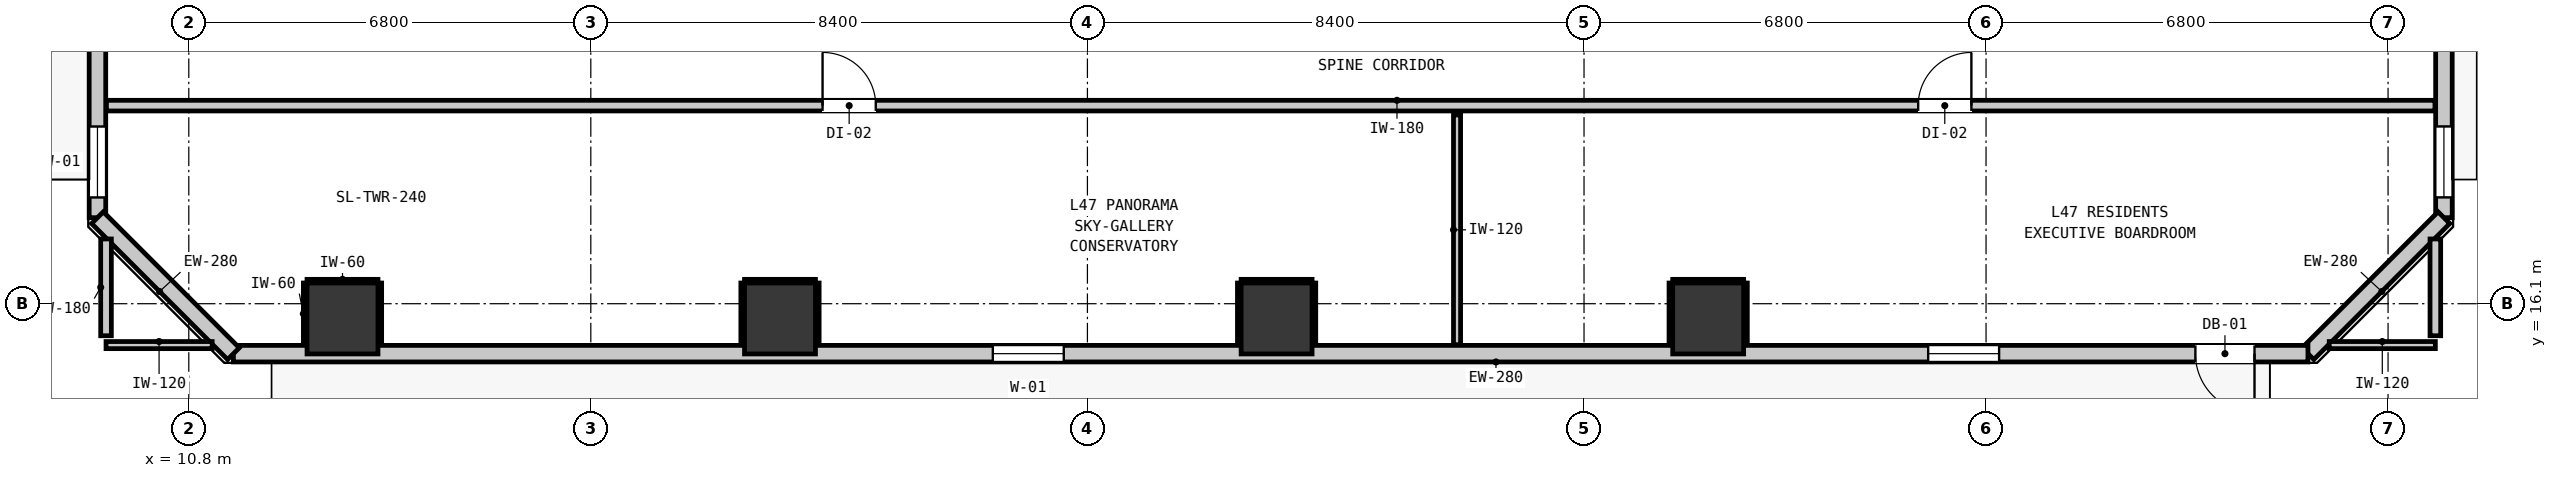
"""IFC4 building model, lengths in metres.
Left out: names, types, materials, properties, quantities, classifications, styles, units other than length and angle.
Written with IfcOpenShell. Run it as: python <this file> out.ifc"""

import sys

from ifc_helpers import new_model, si_unit, direction, frame, frame_2d, origin, origin_2d, place, context, subcontext, project, spatial, rectangle, extrude, element, fill, save


model = new_model("IFC4")
c1 = context("Model", 3, precision=1e-05, world=origin(), true_north=direction((0.0, 1.0)))
c2 = subcontext(c1, "Body", "Model", "MODEL_VIEW")
j1 = project(units=[si_unit("LENGTHUNIT", "METRE"), si_unit("PLANEANGLEUNIT", "RADIAN")], contexts=[c1])
p1 = place(None, origin())
s1 = spatial("IfcSite", under=j1, at=p1, CompositionType="ELEMENT")
p2 = place(p1, origin())
s2 = spatial("IfcBuilding", under=s1, at=p2, CompositionType="ELEMENT")
p3 = place(p2, frame((0.0, 0.0, 162.52)))
s3 = spatial("IfcBuildingStorey", under=s2, at=p3, CompositionType="ELEMENT", Elevation=162.52)
for number, where, z_axis, x_axis in (
    (1, (13.4, 15.85, 0.0), (0.0, 0.0, 1.0), (1.0, 0.0, 0.0)),
    (2, (20.8, 15.85, 0.0), (0.0, 0.0, 1.0), (1.0, 0.0, 0.0)),
    (3, (29.2, 15.85, 0.0), (0.0, 0.0, 1.0), (1.0, 0.0, 0.0)),
    (4, (36.5, 15.85, 0.0), (0.0, 0.0, 1.0), (1.0, 0.0, 0.0)),
):
    element("IfcColumn", number, at=place(p3, frame(where, z_axis=z_axis, x_axis=x_axis)), inside=s3, PredefinedType="COLUMN", context=c2, shape_type="SweptSolid", body=[
        extrude(rectangle(XDim=1.2, YDim=1.2, at=origin_2d()), origin(), (0.0, 0.0, 1.0), 2.9),
    ])
p4 = place(p3, frame((9.255, 17.555, 0.0), z_axis=(0.0, 0.0, 1.0), x_axis=(0.0, 1.0, 0.0)))
e5 = element("IfcWall", 5, at=p4, inside=s3, PredefinedType="STANDARD", context=c2, shape_type="SweptSolid", body=[
    extrude(rectangle(XDim=32.29, YDim=0.28, at=frame_2d((16.145, 0.0))), origin(), (0.0, 0.0, 1.0), 2.9),
])
p5 = place(p4, frame((5.467, 0.0, 0.0)))
e6 = element("IfcOpeningElement", 6, at=p5, cuts=e5, PredefinedType="OPENING", context=c2, shape_type="SweptSolid", body=[
    extrude(rectangle(XDim=1.0, YDim=2.15, at=frame_2d((0.5, 1.075))), frame((0.0, 0.15, 0.0), z_axis=(0.0, -1.0, 0.0), x_axis=(1.0, 0.0, 0.0)), (0.0, 0.0, 1.0), 0.3),
])
p6 = place(p4, frame((0.342, 0.0, 0.85)))
e7 = element("IfcOpeningElement", 7, at=p6, cuts=e5, PredefinedType="OPENING", context=c2, shape_type="SweptSolid", body=[
    extrude(rectangle(XDim=1.2, YDim=1.8, at=frame_2d((0.6, 0.9))), frame((0.0, 0.15, 0.0), z_axis=(0.0, -1.0, 0.0), x_axis=(1.0, 0.0, 0.0)), (0.0, 0.0, 1.0), 0.3),
])
p7 = place(p4, frame((30.677, 0.0, 0.85)))
e8 = element("IfcOpeningElement", 8, at=p7, cuts=e5, PredefinedType="OPENING", context=c2, shape_type="SweptSolid", body=[
    extrude(rectangle(XDim=1.2, YDim=1.8, at=frame_2d((0.6, 0.9))), frame((0.0, 0.15, 0.0), z_axis=(0.0, -1.0, 0.0), x_axis=(1.0, 0.0, 0.0)), (0.0, 0.0, 1.0), 0.3),
])
p8 = place(p3, frame((48.945, 49.845, 0.0), z_axis=(0.0, 0.0, 1.0), x_axis=(0.0, -1.0, 0.0)))
e9 = element("IfcWall", 9, at=p8, inside=s3, PredefinedType="STANDARD", context=c2, shape_type="SweptSolid", body=[
    extrude(rectangle(XDim=32.29, YDim=0.28, at=frame_2d((16.145, 0.0))), origin(), (0.0, 0.0, 1.0), 2.9),
])
p9 = place(p8, frame((2.659, 0.0, 0.0)))
e10 = element("IfcOpeningElement", 10, at=p9, cuts=e9, PredefinedType="OPENING", context=c2, shape_type="SweptSolid", body=[
    extrude(rectangle(XDim=1.0, YDim=2.15, at=frame_2d((0.5, 1.075))), frame((0.0, 0.15, 0.0), z_axis=(0.0, -1.0, 0.0), x_axis=(1.0, 0.0, 0.0)), (0.0, 0.0, 1.0), 0.3),
])
p10 = place(p8, frame((30.747, 0.0, 0.85)))
e11 = element("IfcOpeningElement", 11, at=p10, cuts=e9, PredefinedType="OPENING", context=c2, shape_type="SweptSolid", body=[
    extrude(rectangle(XDim=1.2, YDim=1.8, at=frame_2d((0.6, 0.9))), frame((0.0, 0.15, 0.0), z_axis=(0.0, -1.0, 0.0), x_axis=(1.0, 0.0, 0.0)), (0.0, 0.0, 1.0), 0.3),
])
p11 = place(p8, frame((4.027, 0.0, 0.85)))
e12 = element("IfcOpeningElement", 12, at=p11, cuts=e9, PredefinedType="OPENING", context=c2, shape_type="SweptSolid", body=[
    extrude(rectangle(XDim=0.9, YDim=1.5, at=frame_2d((0.45, 0.75))), frame((0.0, 0.15, 0.0), z_axis=(0.0, -1.0, 0.0), x_axis=(1.0, 0.0, 0.0)), (0.0, 0.0, 1.0), 0.3),
])
p12 = place(p8, frame((0.412, 0.0, 0.85)))
e13 = element("IfcOpeningElement", 13, at=p12, cuts=e9, PredefinedType="OPENING", context=c2, shape_type="SweptSolid", body=[
    extrude(rectangle(XDim=1.2, YDim=1.8, at=frame_2d((0.6, 0.9))), frame((0.0, 0.15, 0.0), z_axis=(0.0, -1.0, 0.0), x_axis=(1.0, 0.0, 0.0)), (0.0, 0.0, 1.0), 0.3),
])
p13 = place(p8, frame((22.895, 0.0, 0.85)))
e14 = element("IfcOpeningElement", 14, at=p13, cuts=e9, PredefinedType="OPENING", context=c2, shape_type="SweptSolid", body=[
    extrude(rectangle(XDim=1.2, YDim=1.8, at=frame_2d((0.6, 0.9))), frame((0.0, 0.15, 0.0), z_axis=(0.0, -1.0, 0.0), x_axis=(1.0, 0.0, 0.0)), (0.0, 0.0, 1.0), 0.3),
])
p14 = place(p3, frame((48.945, 17.555, 0.0), z_axis=(0.0, 0.0, 1.0), x_axis=(-0.707106781187, -0.707106781187, 0.0)))
e15 = element("IfcWall", 15, at=p14, inside=s3, PredefinedType="STANDARD", context=c2, shape_type="SweptSolid", body=[
    extrude(rectangle(XDim=3.253, YDim=0.28, at=frame_2d((1.626, 0.0))), origin(), (0.0, 0.0, 1.0), 2.9),
])
p15 = place(p3, frame((46.645, 15.255, 0.0), z_axis=(0.0, 0.0, 1.0), x_axis=(-1.0, 0.0, 0.0)))
e16 = element("IfcWall", 16, at=p15, inside=s3, PredefinedType="STANDARD", context=c2, shape_type="SweptSolid", body=[
    extrude(rectangle(XDim=35.09, YDim=0.28, at=frame_2d((17.545, 0.0))), origin(), (0.0, 0.0, 1.0), 2.9),
])
p16 = place(p15, frame((0.904, 0.0, 0.0)))
e17 = element("IfcOpeningElement", 17, at=p16, cuts=e16, PredefinedType="OPENING", context=c2, shape_type="SweptSolid", body=[
    extrude(rectangle(XDim=1.0, YDim=2.15, at=frame_2d((0.5, 1.075))), frame((0.0, 0.15, 0.0), z_axis=(0.0, -1.0, 0.0), x_axis=(1.0, 0.0, 0.0)), (0.0, 0.0, 1.0), 0.3),
])
p17 = place(p15, frame((21.045, 0.0, 0.85)))
e18 = element("IfcOpeningElement", 18, at=p17, cuts=e16, PredefinedType="OPENING", context=c2, shape_type="SweptSolid", body=[
    extrude(rectangle(XDim=1.2, YDim=1.8, at=frame_2d((0.6, 0.9))), frame((0.0, 0.15, 0.0), z_axis=(0.0, -1.0, 0.0), x_axis=(1.0, 0.0, 0.0)), (0.0, 0.0, 1.0), 0.3),
])
p18 = place(p15, frame((5.224, 0.0, 0.85)))
e19 = element("IfcOpeningElement", 19, at=p18, cuts=e16, PredefinedType="OPENING", context=c2, shape_type="SweptSolid", body=[
    extrude(rectangle(XDim=1.2, YDim=1.8, at=frame_2d((0.6, 0.9))), frame((0.0, 0.15, 0.0), z_axis=(0.0, -1.0, 0.0), x_axis=(1.0, 0.0, 0.0)), (0.0, 0.0, 1.0), 0.3),
])
p19 = place(p3, frame((11.555, 15.255, 0.0), z_axis=(0.0, 0.0, 1.0), x_axis=(-0.707106781187, 0.707106781187, 0.0)))
e20 = element("IfcWall", 20, at=p19, inside=s3, PredefinedType="STANDARD", context=c2, shape_type="SweptSolid", body=[
    extrude(rectangle(XDim=3.253, YDim=0.28, at=frame_2d((1.626, 0.0))), origin(), (0.0, 0.0, 1.0), 2.9),
])
p20 = place(p3, frame((9.407, 19.45, 0.0), z_axis=(0.0, 0.0, 1.0), x_axis=(1.0, 0.0, 0.0)))
e21 = element("IfcWall", 21, at=p20, inside=s3, PredefinedType="PARTITIONING", context=c2, shape_type="SweptSolid", body=[
    extrude(rectangle(XDim=39.386, YDim=0.18, at=frame_2d((19.693, 0.0))), origin(), (0.0, 0.0, 1.0), 2.9),
])
p21 = place(p20, frame((12.113, 0.0, 0.0)))
e22 = element("IfcOpeningElement", 22, at=p21, cuts=e21, PredefinedType="OPENING", context=c2, shape_type="SweptSolid", body=[
    extrude(rectangle(XDim=0.9, YDim=2.1, at=frame_2d((0.45, 1.05))), frame((0.0, 0.1, 0.0), z_axis=(0.0, -1.0, 0.0), x_axis=(1.0, 0.0, 0.0)), (0.0, 0.0, 1.0), 0.2),
])
p22 = place(p20, frame((30.645, 0.0, 0.0)))
e23 = element("IfcOpeningElement", 23, at=p22, cuts=e21, PredefinedType="OPENING", context=c2, shape_type="SweptSolid", body=[
    extrude(rectangle(XDim=0.9, YDim=2.1, at=frame_2d((0.45, 1.05))), frame((0.0, 0.1, 0.0), z_axis=(0.0, -1.0, 0.0), x_axis=(1.0, 0.0, 0.0)), (0.0, 0.0, 1.0), 0.2),
])
for number, where, z_axis, x_axis in (
    (24, (9.4, 15.4, 0.0), (0.0, 0.0, 1.0), (1.0, 0.0, 0.0)),
    (25, (47.005, 15.4, 0.0), (0.0, 0.0, 1.0), (1.0, 0.0, 0.0)),
):
    element("IfcWall", number, at=place(p3, frame(where, z_axis=z_axis, x_axis=x_axis)), inside=s3, PredefinedType="PARTITIONING", context=c2, shape_type="SweptSolid", body=[
        extrude(rectangle(XDim=1.795, YDim=0.12, at=frame_2d((0.897, 0.0))), origin(), (0.0, 0.0, 1.0), 2.9),
    ])
for number, where, z_axis, x_axis in (
    (26, (9.4, 15.558, 0.0), (0.0, 0.0, 1.0), (0.0, 1.0, 0.0)),
    (27, (48.8, 15.558, 0.0), (0.0, 0.0, 1.0), (0.0, 1.0, 0.0)),
):
    element("IfcWall", number, at=place(p3, frame(where, z_axis=z_axis, x_axis=x_axis)), inside=s3, PredefinedType="PARTITIONING", context=c2, shape_type="SweptSolid", body=[
        extrude(rectangle(XDim=1.637, YDim=0.18, at=frame_2d((0.818, 0.0))), origin(), (0.0, 0.0, 1.0), 2.9),
    ])
p23 = place(p3, frame((32.252, 15.407, 0.0), z_axis=(0.0, 0.0, 1.0), x_axis=(0.0, 1.0, 0.0)))
e28 = element("IfcWall", 28, at=p23, inside=s3, PredefinedType="PARTITIONING", context=c2, shape_type="SweptSolid", body=[
    extrude(rectangle(XDim=3.885, YDim=0.12, at=frame_2d((1.942, 0.0))), origin(), (0.0, 0.0, 1.0), 2.9),
])
p24 = place(p3, frame((12.8, 16.482, 0.0), z_axis=(0.0, 0.0, 1.0), x_axis=(1.0, 0.0, 0.0)))
e29 = element("IfcWall", 29, at=p24, inside=s3, PredefinedType="PARTITIONING", context=c2, shape_type="SweptSolid", body=[
    extrude(rectangle(XDim=1.2, YDim=0.06, at=frame_2d((0.6, 0.0))), origin(), (0.0, 0.0, 1.0), 1.45),
])
for number, where, z_axis, x_axis in (
    (30, (12.768, 15.41, 0.0), (0.0, 0.0, 1.0), (0.0, 1.0, 0.0)),
    (31, (14.032, 15.41, 0.0), (0.0, 0.0, 1.0), (0.0, 1.0, 0.0)),
):
    element("IfcWall", number, at=place(p3, frame(where, z_axis=z_axis, x_axis=x_axis)), inside=s3, PredefinedType="PARTITIONING", context=c2, shape_type="SweptSolid", body=[
        extrude(rectangle(XDim=1.04, YDim=0.06, at=frame_2d((0.52, 0.0))), origin(), (0.0, 0.0, 1.0), 0.905),
    ])
p25 = place(p3, frame((20.2, 16.482, 0.0), z_axis=(0.0, 0.0, 1.0), x_axis=(1.0, 0.0, 0.0)))
e32 = element("IfcWall", 32, at=p25, inside=s3, PredefinedType="PARTITIONING", context=c2, shape_type="SweptSolid", body=[
    extrude(rectangle(XDim=1.2, YDim=0.06, at=frame_2d((0.6, 0.0))), origin(), (0.0, 0.0, 1.0), 1.45),
])
for number, where, z_axis, x_axis in (
    (33, (20.168, 15.41, 0.0), (0.0, 0.0, 1.0), (0.0, 1.0, 0.0)),
    (34, (21.432, 15.41, 0.0), (0.0, 0.0, 1.0), (0.0, 1.0, 0.0)),
):
    element("IfcWall", number, at=place(p3, frame(where, z_axis=z_axis, x_axis=x_axis)), inside=s3, PredefinedType="PARTITIONING", context=c2, shape_type="SweptSolid", body=[
        extrude(rectangle(XDim=1.04, YDim=0.06, at=frame_2d((0.52, 0.0))), origin(), (0.0, 0.0, 1.0), 0.905),
    ])
p26 = place(p3, frame((28.6, 16.482, 0.0), z_axis=(0.0, 0.0, 1.0), x_axis=(1.0, 0.0, 0.0)))
e35 = element("IfcWall", 35, at=p26, inside=s3, PredefinedType="PARTITIONING", context=c2, shape_type="SweptSolid", body=[
    extrude(rectangle(XDim=1.2, YDim=0.06, at=frame_2d((0.6, 0.0))), origin(), (0.0, 0.0, 1.0), 1.45),
])
for number, where, z_axis, x_axis in (
    (36, (28.568, 15.41, 0.0), (0.0, 0.0, 1.0), (0.0, 1.0, 0.0)),
    (37, (29.832, 15.41, 0.0), (0.0, 0.0, 1.0), (0.0, 1.0, 0.0)),
):
    element("IfcWall", number, at=place(p3, frame(where, z_axis=z_axis, x_axis=x_axis)), inside=s3, PredefinedType="PARTITIONING", context=c2, shape_type="SweptSolid", body=[
        extrude(rectangle(XDim=1.04, YDim=0.06, at=frame_2d((0.52, 0.0))), origin(), (0.0, 0.0, 1.0), 0.905),
    ])
p27 = place(p3, frame((35.9, 16.482, 0.0), z_axis=(0.0, 0.0, 1.0), x_axis=(1.0, 0.0, 0.0)))
e38 = element("IfcWall", 38, at=p27, inside=s3, PredefinedType="PARTITIONING", context=c2, shape_type="SweptSolid", body=[
    extrude(rectangle(XDim=1.2, YDim=0.06, at=frame_2d((0.6, 0.0))), origin(), (0.0, 0.0, 1.0), 1.45),
])
for number, where, z_axis, x_axis in (
    (39, (35.868, 15.41, 0.0), (0.0, 0.0, 1.0), (0.0, 1.0, 0.0)),
    (40, (37.132, 15.41, 0.0), (0.0, 0.0, 1.0), (0.0, 1.0, 0.0)),
):
    element("IfcWall", number, at=place(p3, frame(where, z_axis=z_axis, x_axis=x_axis)), inside=s3, PredefinedType="PARTITIONING", context=c2, shape_type="SweptSolid", body=[
        extrude(rectangle(XDim=1.04, YDim=0.06, at=frame_2d((0.52, 0.0))), origin(), (0.0, 0.0, 1.0), 0.905),
    ])
p28 = place(p16, origin())
e41 = element("IfcDoor", 41, at=p28, inside=s3, OperationType="SINGLE_SWING_LEFT", PredefinedType="DOOR", context=c2, shape_type="SweptSolid", body=[
    extrude(rectangle(XDim=1.0, YDim=2.15, at=frame_2d((0.5, 1.075))), frame((0.0, 0.025, 0.0), z_axis=(0.0, -1.0, 0.0), x_axis=(1.0, 0.0, 0.0)), (0.0, 0.0, 1.0), 0.05),
])
fill(e17, e41)
p29 = place(p6, origin())
e42 = element("IfcWindow", 42, at=p29, inside=s3, PartitioningType="SINGLE_PANEL", PredefinedType="WINDOW", context=c2, shape_type="SweptSolid", body=[
    extrude(rectangle(XDim=1.2, YDim=1.8, at=frame_2d((0.6, 0.9))), frame((0.0, 0.03, 0.0), z_axis=(0.0, -1.0, 0.0), x_axis=(1.0, 0.0, 0.0)), (0.0, 0.0, 1.0), 0.06),
])
fill(e7, e42)
p30 = place(p10, origin())
e43 = element("IfcWindow", 43, at=p30, inside=s3, PartitioningType="SINGLE_PANEL", PredefinedType="WINDOW", context=c2, shape_type="SweptSolid", body=[
    extrude(rectangle(XDim=1.2, YDim=1.8, at=frame_2d((0.6, 0.9))), frame((0.0, 0.03, 0.0), z_axis=(0.0, -1.0, 0.0), x_axis=(1.0, 0.0, 0.0)), (0.0, 0.0, 1.0), 0.06),
])
fill(e11, e43)
p31 = place(p17, origin())
e44 = element("IfcWindow", 44, at=p31, inside=s3, PartitioningType="SINGLE_PANEL", PredefinedType="WINDOW", context=c2, shape_type="SweptSolid", body=[
    extrude(rectangle(XDim=1.2, YDim=1.8, at=frame_2d((0.6, 0.9))), frame((0.0, 0.03, 0.0), z_axis=(0.0, -1.0, 0.0), x_axis=(1.0, 0.0, 0.0)), (0.0, 0.0, 1.0), 0.06),
])
fill(e18, e44)
p32 = place(p18, origin())
e45 = element("IfcWindow", 45, at=p32, inside=s3, PartitioningType="SINGLE_PANEL", PredefinedType="WINDOW", context=c2, shape_type="SweptSolid", body=[
    extrude(rectangle(XDim=1.2, YDim=1.8, at=frame_2d((0.6, 0.9))), frame((0.0, 0.03, 0.0), z_axis=(0.0, -1.0, 0.0), x_axis=(1.0, 0.0, 0.0)), (0.0, 0.0, 1.0), 0.06),
])
fill(e19, e45)
p33 = place(p21, origin())
e46 = element("IfcDoor", 46, at=p33, inside=s3, OperationType="SINGLE_SWING_LEFT", PredefinedType="DOOR", context=c2, shape_type="SweptSolid", body=[
    extrude(rectangle(XDim=0.9, YDim=2.1, at=frame_2d((0.45, 1.05))), frame((0.0, 0.025, 0.0), z_axis=(0.0, -1.0, 0.0), x_axis=(1.0, 0.0, 0.0)), (0.0, 0.0, 1.0), 0.05),
])
fill(e22, e46)
p34 = place(p22, origin())
e47 = element("IfcDoor", 47, at=p34, inside=s3, OperationType="SINGLE_SWING_RIGHT", PredefinedType="DOOR", context=c2, shape_type="SweptSolid", body=[
    extrude(rectangle(XDim=0.9, YDim=2.1, at=frame_2d((0.45, 1.05))), frame((0.0, 0.025, 0.0), z_axis=(0.0, -1.0, 0.0), x_axis=(1.0, 0.0, 0.0)), (0.0, 0.0, 1.0), 0.05),
])
fill(e23, e47)
save(model, sys.argv[1])
